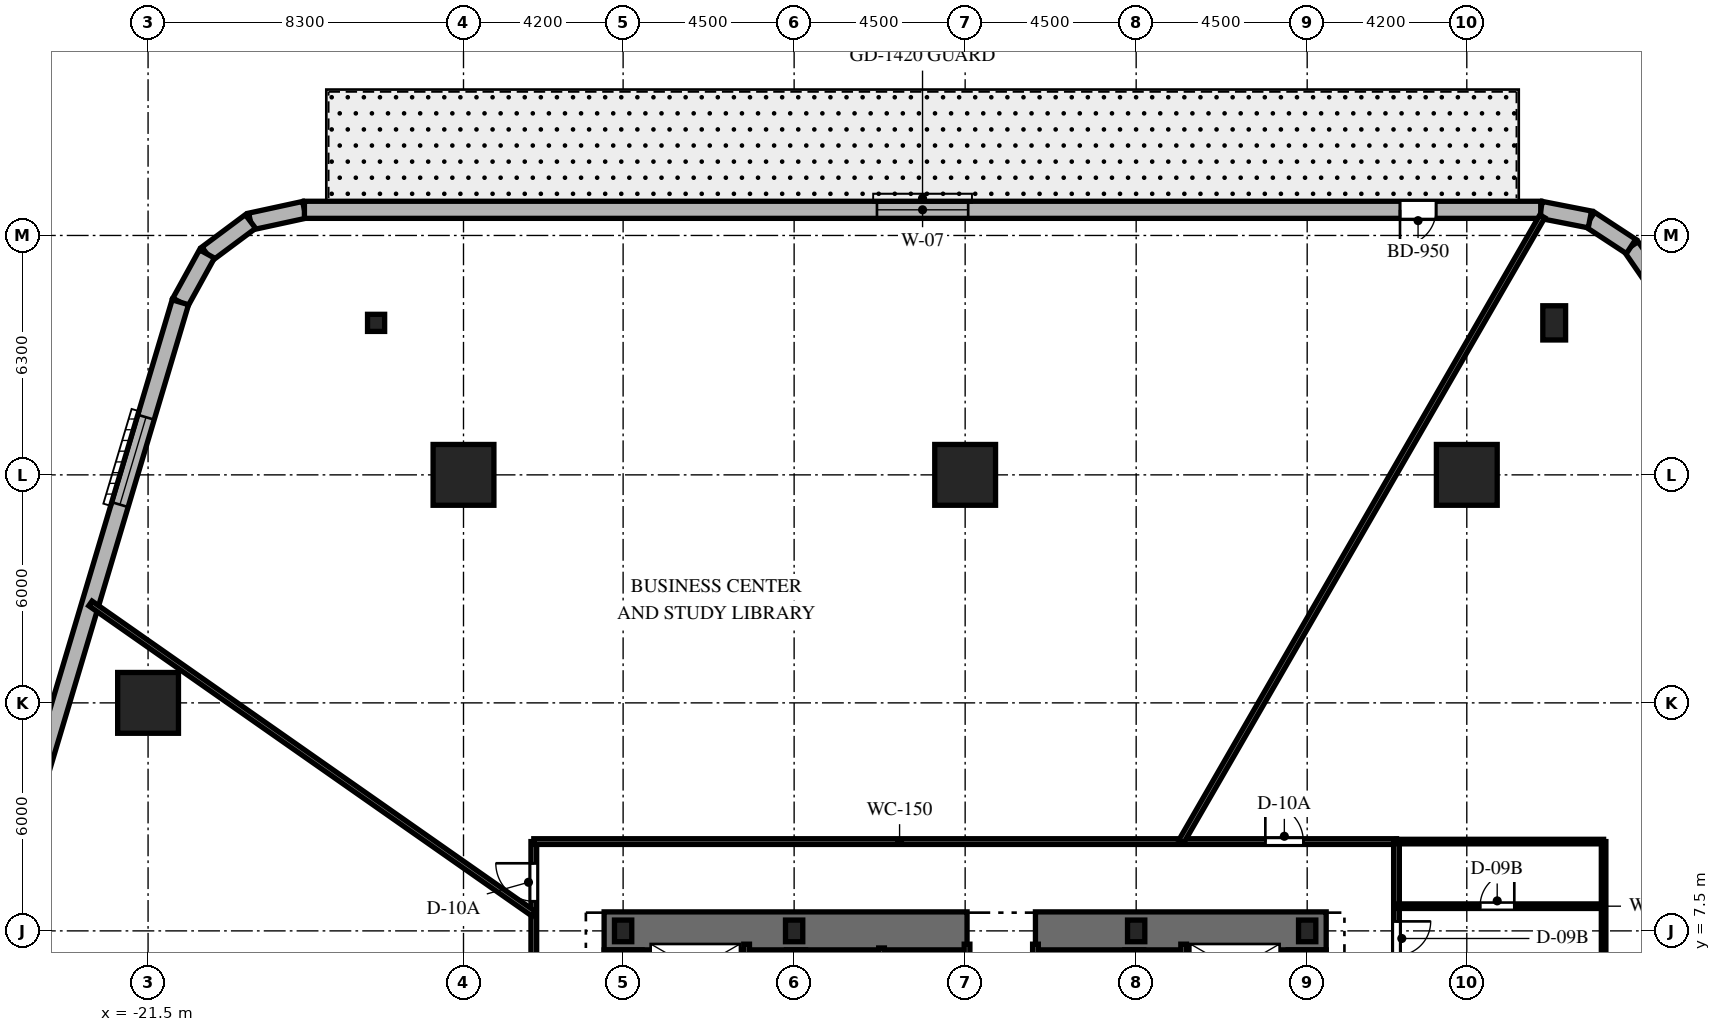
"""IFC4 building model, lengths in metres.
Left out: names, types, materials, properties, quantities, classifications, styles, units other than length and angle.
Written with IfcOpenShell. Run it as: python <this file> out.ifc"""

import sys

from ifc_helpers import new_model, si_unit, direction, frame, frame_2d, origin, origin_2d, place, context, subcontext, project, spatial, rectangle, i_section, extrude, element, fill, save


model = new_model("IFC4")
c1 = context("Model", 3, precision=1e-05, world=origin(), true_north=direction((0.0, 1.0)))
c2 = subcontext(c1, "Body", "Model", "MODEL_VIEW")
j1 = project(units=[si_unit("LENGTHUNIT", "METRE"), si_unit("PLANEANGLEUNIT", "RADIAN")], contexts=[c1])
p1 = place(None, origin())
s1 = spatial("IfcSite", under=j1, at=p1, CompositionType="ELEMENT")
p2 = place(p1, origin())
s2 = spatial("IfcBuilding", under=s1, at=p2, CompositionType="ELEMENT")
p3 = place(p2, frame((0.0, 0.0, 18.6)))
s3 = spatial("IfcBuildingStorey", under=s2, at=p3, CompositionType="ELEMENT", Elevation=18.6)
p4 = place(p3, frame((-9.5, 7.5, 0.0), z_axis=(0.0, 0.0, 1.0), x_axis=(1.0, 0.0, 0.0)))
e1 = element("IfcWall", 1, at=p4, inside=s3, PredefinedType="SHEAR", context=c2, shape_type="SweptSolid", body=[
    extrude(rectangle(XDim=9.55, YDim=1.0, at=frame_2d((4.775, 0.0))), origin(), (0.0, 0.0, 1.0), 4.8),
])
p5 = place(p3, frame((1.85, 7.5, 0.0), z_axis=(0.0, 0.0, 1.0), x_axis=(1.0, 0.0, 0.0)))
e2 = element("IfcWall", 2, at=p5, inside=s3, PredefinedType="SHEAR", context=c2, shape_type="SweptSolid", body=[
    extrude(rectangle(XDim=7.65, YDim=1.0, at=frame_2d((3.825, 0.0))), origin(), (0.0, 0.0, 1.0), 4.8),
])
p6 = place(p3, frame((-9.0, -7.0, 0.0), z_axis=(0.0, 0.0, 1.0), x_axis=(0.0, 1.0, 0.0)))
e3 = element("IfcWall", 3, at=p6, inside=s3, PredefinedType="SHEAR", context=c2, shape_type="SweptSolid", body=[
    extrude(rectangle(XDim=14.0, YDim=1.0, at=frame_2d((7.0, 0.0))), origin(), (0.0, 0.0, 1.0), 4.8),
])
p7 = place(p6, frame((10.125, 0.0, 0.0)))
e4 = element("IfcOpeningElement", 4, at=p7, cuts=e3, PredefinedType="OPENING", context=c2, shape_type="SweptSolid", body=[
    extrude(rectangle(XDim=1.05, YDim=2.15, at=frame_2d((0.525, 1.075))), frame((0.0, 0.51, 0.0), z_axis=(0.0, -1.0, 0.0), x_axis=(1.0, 0.0, 0.0)), (0.0, 0.0, 1.0), 1.02),
])
p8 = place(p3, frame((9.0, -7.0, 0.0), z_axis=(0.0, 0.0, 1.0), x_axis=(0.0, 1.0, 0.0)))
e5 = element("IfcWall", 5, at=p8, inside=s3, PredefinedType="SHEAR", context=c2, shape_type="SweptSolid", body=[
    extrude(rectangle(XDim=14.0, YDim=1.0, at=frame_2d((7.0, 0.0))), origin(), (0.0, 0.0, 1.0), 4.8),
])
p9 = place(p8, frame((10.125, 0.0, 0.0)))
e6 = element("IfcOpeningElement", 6, at=p9, cuts=e5, PredefinedType="OPENING", context=c2, shape_type="SweptSolid", body=[
    extrude(rectangle(XDim=1.05, YDim=2.15, at=frame_2d((0.525, 1.075))), frame((0.0, 0.51, 0.0), z_axis=(0.0, -1.0, 0.0), x_axis=(1.0, 0.0, 0.0)), (0.0, 0.0, 1.0), 1.02),
])
for number, where, z_axis, x_axis in (
    (7, (-4.45, 2.25, 0.0), (0.0, 0.0, 1.0), (0.0, 1.0, 0.0)),
    (8, (4.45, 2.25, 0.0), (0.0, 0.0, 1.0), (0.0, 1.0, 0.0)),
):
    element("IfcWall", number, at=place(p3, frame(where, z_axis=z_axis, x_axis=x_axis)), inside=s3, PredefinedType="SHEAR", context=c2, shape_type="SweptSolid", body=[
        extrude(rectangle(XDim=4.75, YDim=0.5, at=frame_2d((2.375, 0.0))), origin(), (0.0, 0.0, 1.0), 4.8),
    ])
for number, where, z_axis, x_axis in (
    (9, (9.0, 7.5, 0.0), (0.0, 0.0, 1.0), (1.0, 0.0, 0.0)),
    (10, (4.5, 7.5, 0.0), (0.0, 0.0, 1.0), (1.0, 0.0, 0.0)),
    (11, (-4.5, 7.5, 0.0), (0.0, 0.0, 1.0), (1.0, 0.0, 0.0)),
    (12, (-9.0, 7.5, 0.0), (0.0, 0.0, 1.0), (1.0, 0.0, 0.0)),
):
    element("IfcColumn", number, at=place(p3, frame(where, z_axis=z_axis, x_axis=x_axis)), inside=s3, PredefinedType="COLUMN", context=c2, shape_type="SweptSolid", body=[
        extrude(i_section(OverallWidth=0.454, OverallDepth=0.569, WebThickness=0.078, FlangeThickness=0.125, at=origin_2d()), origin(), (0.0, 0.0, 1.0), 4.8),
    ])
for number, where, z_axis, x_axis in (
    (13, (-21.5, 13.5, 0.0), (0.0, 0.0, 1.0), (1.0, 0.0, 0.0)),
    (14, (-13.2, 19.5, 0.0), (0.0, 0.0, 1.0), (1.0, 0.0, 0.0)),
    (15, (0.0, 19.5, 0.0), (0.0, 0.0, 1.0), (1.0, 0.0, 0.0)),
    (16, (13.2, 19.5, 0.0), (0.0, 0.0, 1.0), (1.0, 0.0, 0.0)),
):
    element("IfcColumn", number, at=place(p3, frame(where, z_axis=z_axis, x_axis=x_axis)), inside=s3, PredefinedType="COLUMN", context=c2, shape_type="SweptSolid", body=[
        extrude(rectangle(XDim=1.6, YDim=1.6, at=origin_2d()), origin(), (0.0, 0.0, 1.0), 4.8),
    ])
p10 = place(p3, frame((15.5, 23.5, 0.0), z_axis=(0.0, 0.0, 1.0), x_axis=(1.0, 0.0, 0.0)))
e17 = element("IfcColumn", 17, at=p10, inside=s3, PredefinedType="PILASTER", context=c2, shape_type="SweptSolid", body=[
    extrude(rectangle(XDim=0.6, YDim=0.9, at=origin_2d()), origin(), (0.0, 0.0, 1.0), 4.8),
])
p11 = place(p3, frame((-15.5, 23.5, 0.0), z_axis=(0.0, 0.0, 1.0), x_axis=(1.0, 0.0, 0.0)))
e18 = element("IfcColumn", 18, at=p11, inside=s3, PredefinedType="PILASTER", context=c2, shape_type="SweptSolid", body=[
    extrude(rectangle(XDim=0.45, YDim=0.45, at=origin_2d()), origin(), (0.0, 0.0, 1.0), 4.8),
])
p12 = place(p3, frame((18.271, 24.426, 0.0), z_axis=(0.0, 0.0, 1.0), x_axis=(-0.567629051817, 0.823284434162, 0.0)))
e19 = element("IfcWall", 19, at=p12, inside=s3, PredefinedType="SOLIDWALL", context=c2, shape_type="SweptSolid", body=[
    extrude(rectangle(XDim=1.318, YDim=0.45, at=frame_2d((0.659, 0.0))), origin(), (0.0, 0.0, 1.0), 4.48),
])
p13 = place(p3, frame((17.523, 25.511, 0.0), z_axis=(0.0, 0.0, 1.0), x_axis=(-0.83622878949, 0.548380717776, 0.0)))
e20 = element("IfcWall", 20, at=p13, inside=s3, PredefinedType="SOLIDWALL", context=c2, shape_type="SweptSolid", body=[
    extrude(rectangle(XDim=1.296, YDim=0.45, at=frame_2d((0.648, 0.0))), origin(), (0.0, 0.0, 1.0), 4.48),
])
p14 = place(p3, frame((16.439, 26.222, 0.0), z_axis=(0.0, 0.0, 1.0), x_axis=(-0.98134938685, 0.192232621919, 0.0)))
e21 = element("IfcWall", 21, at=p14, inside=s3, PredefinedType="SOLIDWALL", context=c2, shape_type="SweptSolid", body=[
    extrude(rectangle(XDim=1.318, YDim=0.45, at=frame_2d((0.659, 0.0))), origin(), (0.0, 0.0, 1.0), 4.48),
])
p15 = place(p3, frame((-17.386, 26.475, 0.0), z_axis=(0.0, 0.0, 1.0), x_axis=(-0.977277895208, -0.211962061551, 0.0)))
e22 = element("IfcWall", 22, at=p15, inside=s3, PredefinedType="SOLIDWALL", context=c2, shape_type="SweptSolid", body=[
    extrude(rectangle(XDim=1.452, YDim=0.45, at=frame_2d((0.726, 0.0))), origin(), (0.0, 0.0, 1.0), 4.48),
])
p16 = place(p3, frame((-18.805, 26.167, 0.0), z_axis=(0.0, 0.0, 1.0), x_axis=(-0.801863548993, -0.597507195603, 0.0)))
e23 = element("IfcWall", 23, at=p16, inside=s3, PredefinedType="SOLIDWALL", context=c2, shape_type="SweptSolid", body=[
    extrude(rectangle(XDim=1.428, YDim=0.45, at=frame_2d((0.714, 0.0))), origin(), (0.0, 0.0, 1.0), 4.48),
])
p17 = place(p3, frame((-19.95, 25.314, 0.0), z_axis=(0.0, 0.0, 1.0), x_axis=(-0.482499474814, -0.875896259157, 0.0)))
e24 = element("IfcWall", 24, at=p17, inside=s3, PredefinedType="SOLIDWALL", context=c2, shape_type="SweptSolid", body=[
    extrude(rectangle(XDim=1.452, YDim=0.45, at=frame_2d((0.726, 0.0))), origin(), (0.0, 0.0, 1.0), 4.48),
])
p18 = place(p3, frame((15.146, 26.475, 0.0), z_axis=(0.0, 0.0, 1.0), x_axis=(-1.0, 0.0, 0.0)))
e25 = element("IfcWall", 25, at=p18, inside=s3, PredefinedType="SOLIDWALL", context=c2, shape_type="SweptSolid", body=[
    extrude(rectangle(XDim=32.531, YDim=0.45, at=frame_2d((16.266, 0.0))), origin(), (0.0, 0.0, 1.0), 4.48),
])
p19 = place(p18, frame((2.753, 0.0, 0.0)))
e26 = element("IfcOpeningElement", 26, at=p19, cuts=e25, PredefinedType="OPENING", context=c2, shape_type="SweptSolid", body=[
    extrude(rectangle(XDim=0.95, YDim=2.15, at=frame_2d((0.475, 1.075))), frame((0.0, 0.235, 0.0), z_axis=(0.0, -1.0, 0.0), x_axis=(1.0, 0.0, 0.0)), (0.0, 0.0, 1.0), 0.47),
])
p20 = place(p18, frame((15.066, 0.0, 0.85)))
e27 = element("IfcOpeningElement", 27, at=p20, cuts=e25, PredefinedType="OPENING", context=c2, shape_type="SweptSolid", body=[
    extrude(rectangle(XDim=2.4, YDim=2.4, at=frame_2d((1.2, 1.2))), frame((0.0, 0.235, 0.0), z_axis=(0.0, -1.0, 0.0), x_axis=(1.0, 0.0, 0.0)), (0.0, 0.0, 1.0), 0.47),
])
p21 = place(p3, frame((-20.651, 24.042, 0.0), z_axis=(0.0, 0.0, 1.0), x_axis=(-0.286003469805, -0.958228581947, 0.0)))
e28 = element("IfcWall", 28, at=p21, inside=s3, PredefinedType="SOLIDWALL", context=c2, shape_type="SweptSolid", body=[
    extrude(rectangle(XDim=25.362, YDim=0.45, at=frame_2d((12.681, 0.0))), origin(), (0.0, 0.0, 1.0), 4.48),
])
p22 = place(p21, frame((3.157, 0.0, 0.85)))
e29 = element("IfcOpeningElement", 29, at=p22, cuts=e28, PredefinedType="OPENING", context=c2, shape_type="SweptSolid", body=[
    extrude(rectangle(XDim=2.4, YDim=2.4, at=frame_2d((1.2, 1.2))), frame((0.0, 0.235, 0.0), z_axis=(0.0, -1.0, 0.0), x_axis=(1.0, 0.0, 0.0)), (0.0, 0.0, 1.0), 0.47),
])
p23 = place(p21, frame((15.407, 0.0, 0.85)))
e30 = element("IfcOpeningElement", 30, at=p23, cuts=e28, PredefinedType="OPENING", context=c2, shape_type="SweptSolid", body=[
    extrude(rectangle(XDim=2.4, YDim=2.4, at=frame_2d((1.2, 1.2))), frame((0.0, 0.235, 0.0), z_axis=(0.0, -1.0, 0.0), x_axis=(1.0, 0.0, 0.0)), (0.0, 0.0, 1.0), 0.47),
])
for number, where, z_axis, x_axis in (
    (31, (-5.75, 5.74, 0.0), (0.0, 0.0, 1.0), (0.0, 1.0, 0.0)),
    (32, (5.75, 5.74, 0.0), (0.0, 0.0, 1.0), (0.0, 1.0, 0.0)),
):
    element("IfcWall", number, at=place(p3, frame(where, z_axis=z_axis, x_axis=x_axis)), inside=s3, PredefinedType="PARTITIONING", context=c2, shape_type="SweptSolid", body=[
        extrude(rectangle(XDim=1.41, YDim=0.15, at=frame_2d((0.705, 0.0))), origin(), (0.0, 0.0, 1.0), 4.48),
    ])
p24 = place(p3, frame((-2.2, 5.2, 0.0), z_axis=(0.0, 0.0, 1.0), x_axis=(0.0, 1.0, 0.0)))
e33 = element("IfcWall", 33, at=p24, inside=s3, PredefinedType="PARTITIONING", context=c2, shape_type="SweptSolid", body=[
    extrude(rectangle(XDim=1.85, YDim=0.15, at=frame_2d((0.925, 0.0))), origin(), (0.0, 0.0, 1.0), 4.48),
])
for number, where, z_axis, x_axis in (
    (34, (0.05, 5.2, 0.0), (0.0, 0.0, 1.0), (0.0, 1.0, 0.0)),
    (35, (1.85, 5.2, 0.0), (0.0, 0.0, 1.0), (0.0, 1.0, 0.0)),
):
    element("IfcWall", number, at=place(p3, frame(where, z_axis=z_axis, x_axis=x_axis)), inside=s3, PredefinedType="PARTITIONING", context=c2, shape_type="SweptSolid", body=[
        extrude(rectangle(XDim=1.95, YDim=0.15, at=frame_2d((0.975, 0.0))), origin(), (0.0, 0.0, 1.0), 4.48),
    ])
p25 = place(p3, frame((-11.35, -9.85, 0.0), z_axis=(0.0, 0.0, 1.0), x_axis=(0.0, 1.0, 0.0)))
e36 = element("IfcWall", 36, at=p25, inside=s3, PredefinedType="PARTITIONING", context=c2, shape_type="SweptSolid", body=[
    extrude(rectangle(XDim=19.7, YDim=0.15, at=frame_2d((9.85, 0.0))), origin(), (0.0, 0.0, 1.0), 3.522),
])
p26 = place(p25, frame((18.129, 0.0, 0.0)))
e37 = element("IfcOpeningElement", 37, at=p26, cuts=e36, PredefinedType="OPENING", context=c2, shape_type="SweptSolid", body=[
    extrude(rectangle(XDim=1.0, YDim=2.03, at=frame_2d((0.5, 1.015))), frame((0.0, 0.085, 0.0), z_axis=(0.0, -1.0, 0.0), x_axis=(1.0, 0.0, 0.0)), (0.0, 0.0, 1.0), 0.17),
])
p27 = place(p25, frame((8.545, 0.0, 0.0)))
e38 = element("IfcOpeningElement", 38, at=p27, cuts=e36, PredefinedType="OPENING", context=c2, shape_type="SweptSolid", body=[
    extrude(rectangle(XDim=1.0, YDim=2.03, at=frame_2d((0.5, 1.015))), frame((0.0, 0.085, 0.0), z_axis=(0.0, -1.0, 0.0), x_axis=(1.0, 0.0, 0.0)), (0.0, 0.0, 1.0), 0.17),
])
p28 = place(p3, frame((-11.35, 9.85, 0.0), z_axis=(0.0, 0.0, 1.0), x_axis=(1.0, 0.0, 0.0)))
e39 = element("IfcWall", 39, at=p28, inside=s3, PredefinedType="PARTITIONING", context=c2, shape_type="SweptSolid", body=[
    extrude(rectangle(XDim=22.7, YDim=0.15, at=frame_2d((11.35, 0.0))), origin(), (0.0, 0.0, 1.0), 3.522),
])
p29 = place(p28, frame((19.249, 0.0, 0.0)))
e40 = element("IfcOpeningElement", 40, at=p29, cuts=e39, PredefinedType="OPENING", context=c2, shape_type="SweptSolid", body=[
    extrude(rectangle(XDim=1.0, YDim=2.03, at=frame_2d((0.5, 1.015))), frame((0.0, 0.085, 0.0), z_axis=(0.0, -1.0, 0.0), x_axis=(1.0, 0.0, 0.0)), (0.0, 0.0, 1.0), 0.17),
])
p30 = place(p3, frame((11.35, 9.85, 0.0), z_axis=(0.0, 0.0, 1.0), x_axis=(0.0, -1.0, 0.0)))
e41 = element("IfcWall", 41, at=p30, inside=s3, PredefinedType="PARTITIONING", context=c2, shape_type="SweptSolid", body=[
    extrude(rectangle(XDim=19.7, YDim=0.15, at=frame_2d((9.85, 0.0))), origin(), (0.0, 0.0, 1.0), 3.522),
])
p31 = place(p30, frame((2.1, 0.0, 0.0)))
e42 = element("IfcOpeningElement", 42, at=p31, cuts=e41, PredefinedType="OPENING", context=c2, shape_type="SweptSolid", body=[
    extrude(rectangle(XDim=0.9, YDim=2.03, at=frame_2d((0.45, 1.015))), frame((0.0, 0.085, 0.0), z_axis=(0.0, -1.0, 0.0), x_axis=(1.0, 0.0, 0.0)), (0.0, 0.0, 1.0), 0.17),
])
p32 = place(p3, frame((16.8, 6.45, 0.0), z_axis=(0.0, 0.0, 1.0), x_axis=(0.0, 1.0, 0.0)))
e43 = element("IfcWall", 43, at=p32, inside=s3, PredefinedType="PARTITIONING", context=c2, shape_type="SweptSolid", body=[
    extrude(rectangle(XDim=3.4, YDim=0.12, at=frame_2d((1.7, 0.0))), origin(), (0.0, 0.0, 1.0), 4.48),
])
p33 = place(p3, frame((11.35, 9.85, 0.0), z_axis=(0.0, 0.0, 1.0), x_axis=(1.0, 0.0, 0.0)))
e44 = element("IfcWall", 44, at=p33, inside=s3, PredefinedType="PARTITIONING", context=c2, shape_type="SweptSolid", body=[
    extrude(rectangle(XDim=5.45, YDim=0.12, at=frame_2d((2.725, 0.0))), origin(), (0.0, 0.0, 1.0), 3.614),
])
p34 = place(p3, frame((11.35, 8.15, 0.0), z_axis=(0.0, 0.0, 1.0), x_axis=(1.0, 0.0, 0.0)))
e45 = element("IfcWall", 45, at=p34, inside=s3, PredefinedType="PARTITIONING", context=c2, shape_type="SweptSolid", body=[
    extrude(rectangle(XDim=5.45, YDim=0.12, at=frame_2d((2.725, 0.0))), origin(), (0.0, 0.0, 1.0), 4.48),
])
p35 = place(p34, frame((2.2, 0.0, 0.0)))
e46 = element("IfcOpeningElement", 46, at=p35, cuts=e45, PredefinedType="OPENING", context=c2, shape_type="SweptSolid", body=[
    extrude(rectangle(XDim=0.9, YDim=2.03, at=frame_2d((0.45, 1.015))), frame((0.0, 0.07, 0.0), z_axis=(0.0, -1.0, 0.0), x_axis=(1.0, 0.0, 0.0)), (0.0, 0.0, 1.0), 0.14),
])
p36 = place(p3, frame((5.687, 9.85, 0.0), z_axis=(0.0, 0.0, 1.0), x_axis=(0.499994975061, 0.866028304915, 0.0)))
e47 = element("IfcWall", 47, at=p36, inside=s3, PredefinedType="PARTITIONING", context=c2, shape_type="SweptSolid", body=[
    extrude(rectangle(XDim=18.999, YDim=0.15, at=frame_2d((9.5, 0.0))), origin(), (0.0, 0.0, 1.0), 3.614),
])
p37 = place(p3, frame((-11.35, 7.948, 0.0), z_axis=(0.0, 0.0, 1.0), x_axis=(-0.819152990014, 0.573575085713, 0.0)))
e48 = element("IfcWall", 48, at=p37, inside=s3, PredefinedType="PARTITIONING", context=c2, shape_type="SweptSolid", body=[
    extrude(rectangle(XDim=14.242, YDim=0.15, at=frame_2d((7.121, 0.0))), origin(), (0.0, 0.0, 1.0), 3.614),
])
p38 = place(p19, origin())
e49 = element("IfcDoor", 49, at=p38, inside=s3, OperationType="SINGLE_SWING_RIGHT", PredefinedType="DOOR", context=c2, shape_type="SweptSolid", body=[
    extrude(rectangle(XDim=0.95, YDim=2.15, at=frame_2d((0.475, 1.075))), frame((0.0, 0.025, 0.0), z_axis=(0.0, -1.0, 0.0), x_axis=(1.0, 0.0, 0.0)), (0.0, 0.0, 1.0), 0.05),
])
fill(e26, e49)
p39 = place(p20, origin())
e50 = element("IfcWindow", 50, at=p39, inside=s3, PartitioningType="SINGLE_PANEL", PredefinedType="WINDOW", context=c2, shape_type="SweptSolid", body=[
    extrude(rectangle(XDim=2.4, YDim=2.4, at=frame_2d((1.2, 1.2))), frame((0.0, 0.03, 0.0), z_axis=(0.0, -1.0, 0.0), x_axis=(1.0, 0.0, 0.0)), (0.0, 0.0, 1.0), 0.06),
])
fill(e27, e50)
p40 = place(p22, origin())
e51 = element("IfcWindow", 51, at=p40, inside=s3, PartitioningType="SINGLE_PANEL", PredefinedType="WINDOW", context=c2, shape_type="SweptSolid", body=[
    extrude(rectangle(XDim=2.4, YDim=2.4, at=frame_2d((1.2, 1.2))), frame((0.0, 0.03, 0.0), z_axis=(0.0, -1.0, 0.0), x_axis=(1.0, 0.0, 0.0)), (0.0, 0.0, 1.0), 0.06),
])
fill(e29, e51)
p41 = place(p31, origin())
e52 = element("IfcDoor", 52, at=p41, inside=s3, OperationType="SINGLE_SWING_LEFT", PredefinedType="DOOR", context=c2, shape_type="SweptSolid", body=[
    extrude(rectangle(XDim=0.9, YDim=2.03, at=frame_2d((0.45, 1.015))), frame((0.0, 0.025, 0.0), z_axis=(0.0, -1.0, 0.0), x_axis=(1.0, 0.0, 0.0)), (0.0, 0.0, 1.0), 0.05),
])
fill(e42, e52)
p42 = place(p35, origin())
e53 = element("IfcDoor", 53, at=p42, inside=s3, OperationType="SINGLE_SWING_RIGHT", PredefinedType="DOOR", context=c2, shape_type="SweptSolid", body=[
    extrude(rectangle(XDim=0.9, YDim=2.03, at=frame_2d((0.45, 1.015))), frame((0.0, 0.025, 0.0), z_axis=(0.0, -1.0, 0.0), x_axis=(1.0, 0.0, 0.0)), (0.0, 0.0, 1.0), 0.05),
])
fill(e46, e53)
p43 = place(p29, origin())
e54 = element("IfcDoor", 54, at=p43, inside=s3, OperationType="SINGLE_SWING_LEFT", PredefinedType="DOOR", context=c2, shape_type="SweptSolid", body=[
    extrude(rectangle(XDim=1.0, YDim=2.03, at=frame_2d((0.5, 1.015))), frame((0.0, 0.025, 0.0), z_axis=(0.0, -1.0, 0.0), x_axis=(1.0, 0.0, 0.0)), (0.0, 0.0, 1.0), 0.05),
])
fill(e40, e54)
p44 = place(p26, origin())
e55 = element("IfcDoor", 55, at=p44, inside=s3, OperationType="SINGLE_SWING_RIGHT", PredefinedType="DOOR", context=c2, shape_type="SweptSolid", body=[
    extrude(rectangle(XDim=1.0, YDim=2.03, at=frame_2d((0.5, 1.015))), frame((0.0, 0.025, 0.0), z_axis=(0.0, -1.0, 0.0), x_axis=(1.0, 0.0, 0.0)), (0.0, 0.0, 1.0), 0.05),
])
fill(e37, e55)
save(model, sys.argv[1])
